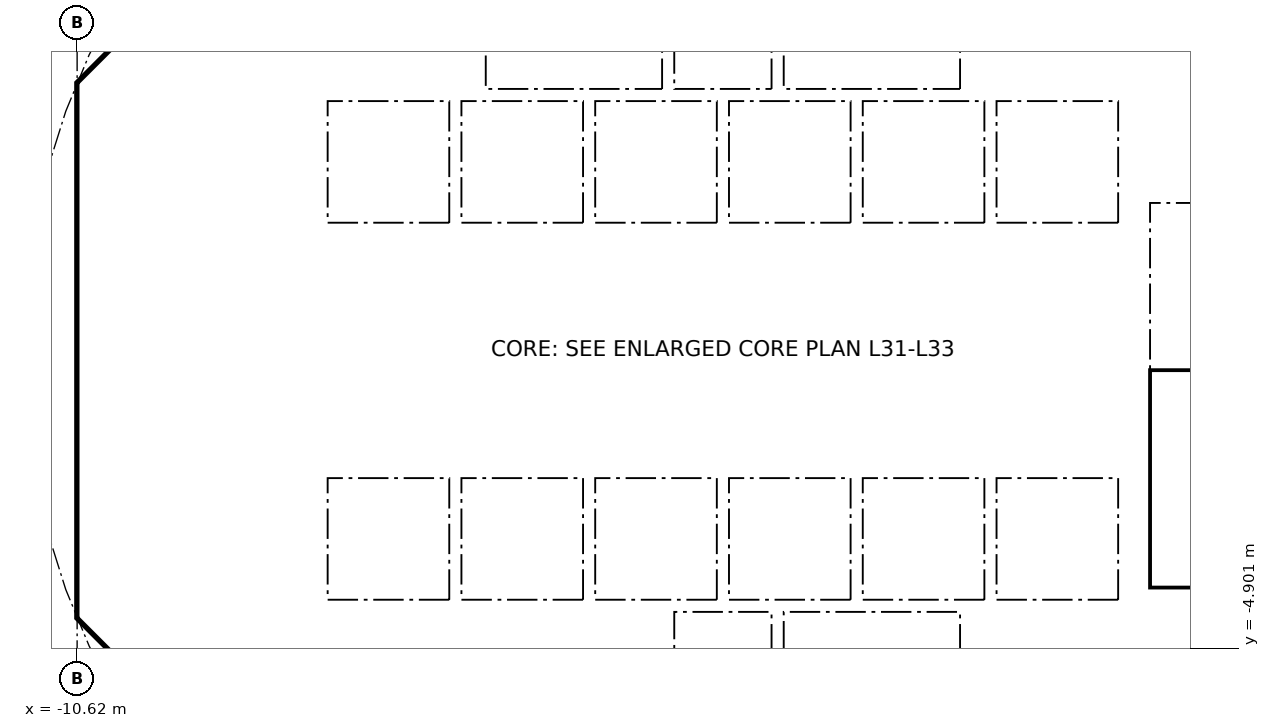
"""IFC4 building model, lengths in metres.
Left out: names, types, materials, properties, quantities, classifications, styles, units other than length and angle.
Written with IfcOpenShell. Run it as: python <this file> out.ifc"""

import sys

from ifc_helpers import new_model, si_unit, direction, frame, frame_2d, origin, place, context, subcontext, project, spatial, polyline, rectangle, outline, extrude, element, fill, save


model = new_model("IFC4")
c1 = context("Model", 3, precision=1e-05, world=origin(), true_north=direction((0.0, 1.0)))
c2 = subcontext(c1, "Body", "Model", "MODEL_VIEW")
j1 = project(units=[si_unit("LENGTHUNIT", "METRE"), si_unit("PLANEANGLEUNIT", "RADIAN")], contexts=[c1])
p1 = place(None, origin())
s1 = spatial("IfcSite", under=j1, at=p1, CompositionType="ELEMENT")
p2 = place(p1, origin())
s2 = spatial("IfcBuilding", under=s1, at=p2, CompositionType="ELEMENT")
p3 = place(p2, frame((0.0, 0.0, 134.4)))
s3 = spatial("IfcBuildingStorey", under=s2, at=p3, CompositionType="ELEMENT", Elevation=134.4)
p4 = place(p3, frame((9.988, 4.613, 0.0), z_axis=(0.0, 0.0, 1.0), x_axis=(-0.707106781187, 0.707106781187, 0.0)))
e1 = element("IfcWall", 1, at=p4, inside=s3, PredefinedType="SHEAR", context=c2, shape_type="SweptSolid", body=[
    extrude(rectangle(XDim=7.602, YDim=0.6, at=frame_2d((3.801, 0.0))), origin(), (0.0, 0.0, 1.0), 3.44),
])
p5 = place(p4, frame((3.201, 0.0, 0.0)))
e2 = element("IfcOpeningElement", 2, at=p5, cuts=e1, PredefinedType="OPENING", context=c2, shape_type="SweptSolid", body=[
    extrude(rectangle(XDim=1.2, YDim=2.1, at=frame_2d((0.6, 1.05))), frame((0.0, 0.31, 0.0), z_axis=(0.0, -1.0, 0.0), x_axis=(1.0, 0.0, 0.0)), (0.0, 0.0, 1.0), 0.62),
])
p6 = place(p3, frame((-4.613, 9.988, 0.0), z_axis=(0.0, 0.0, 1.0), x_axis=(-0.707106781187, -0.707106781187, 0.0)))
e3 = element("IfcWall", 3, at=p6, inside=s3, PredefinedType="SHEAR", context=c2, shape_type="SweptSolid", body=[
    extrude(rectangle(XDim=7.602, YDim=0.6, at=frame_2d((3.801, 0.0))), origin(), (0.0, 0.0, 1.0), 3.44),
])
p7 = place(p6, frame((0.351, 0.0, 0.0)))
e4 = element("IfcOpeningElement", 4, at=p7, cuts=e3, PredefinedType="OPENING", context=c2, shape_type="SweptSolid", body=[
    extrude(rectangle(XDim=1.1, YDim=2.1, at=frame_2d((0.55, 1.05))), frame((0.0, 0.31, 0.0), z_axis=(0.0, -1.0, 0.0), x_axis=(1.0, 0.0, 0.0)), (0.0, 0.0, 1.0), 0.62),
])
p8 = place(p3, frame((-10.325, 3.801, 0.0), z_axis=(0.0, 0.0, 1.0), x_axis=(0.0, -1.0, 0.0)))
e5 = element("IfcWall", 5, at=p8, inside=s3, PredefinedType="SHEAR", context=c2, shape_type="SweptSolid", body=[
    extrude(rectangle(XDim=7.602, YDim=0.6, at=frame_2d((3.801, 0.0))), origin(), (0.0, 0.0, 1.0), 3.44),
])
p9 = place(p8, frame((0.651, 0.0, 0.0)))
e6 = element("IfcOpeningElement", 6, at=p9, cuts=e5, PredefinedType="OPENING", context=c2, shape_type="SweptSolid", body=[
    extrude(rectangle(XDim=1.5, YDim=2.1, at=frame_2d((0.75, 1.05))), frame((0.0, 0.31, 0.0), z_axis=(0.0, -1.0, 0.0), x_axis=(1.0, 0.0, 0.0)), (0.0, 0.0, 1.0), 0.62),
])
p10 = place(p8, frame((5.451, 0.0, 0.0)))
e7 = element("IfcOpeningElement", 7, at=p10, cuts=e5, PredefinedType="OPENING", context=c2, shape_type="SweptSolid", body=[
    extrude(rectangle(XDim=1.5, YDim=2.1, at=frame_2d((0.75, 1.05))), frame((0.0, 0.31, 0.0), z_axis=(0.0, -1.0, 0.0), x_axis=(1.0, 0.0, 0.0)), (0.0, 0.0, 1.0), 0.62),
])
p11 = place(p3, frame((-9.988, -4.613, 0.0), z_axis=(0.0, 0.0, 1.0), x_axis=(0.707106781187, -0.707106781187, 0.0)))
e8 = element("IfcWall", 8, at=p11, inside=s3, PredefinedType="SHEAR", context=c2, shape_type="SweptSolid", body=[
    extrude(rectangle(XDim=7.602, YDim=0.6, at=frame_2d((3.801, 0.0))), origin(), (0.0, 0.0, 1.0), 3.44),
])
p12 = place(p11, frame((6.151, 0.0, 0.0)))
e9 = element("IfcOpeningElement", 9, at=p12, cuts=e8, PredefinedType="OPENING", context=c2, shape_type="SweptSolid", body=[
    extrude(rectangle(XDim=1.1, YDim=2.1, at=frame_2d((0.55, 1.05))), frame((0.0, 0.31, 0.0), z_axis=(0.0, -1.0, 0.0), x_axis=(1.0, 0.0, 0.0)), (0.0, 0.0, 1.0), 0.62),
])
p13 = place(p3, frame((4.613, -9.988, 0.0), z_axis=(0.0, 0.0, 1.0), x_axis=(0.707106781187, 0.707106781187, 0.0)))
e10 = element("IfcWall", 10, at=p13, inside=s3, PredefinedType="SHEAR", context=c2, shape_type="SweptSolid", body=[
    extrude(rectangle(XDim=7.602, YDim=0.6, at=frame_2d((3.801, 0.0))), origin(), (0.0, 0.0, 1.0), 3.44),
])
p14 = place(p13, frame((3.201, 0.0, 0.0)))
e11 = element("IfcOpeningElement", 11, at=p14, cuts=e10, PredefinedType="OPENING", context=c2, shape_type="SweptSolid", body=[
    extrude(rectangle(XDim=1.2, YDim=2.1, at=frame_2d((0.6, 1.05))), frame((0.0, 0.31, 0.0), z_axis=(0.0, -1.0, 0.0), x_axis=(1.0, 0.0, 0.0)), (0.0, 0.0, 1.0), 0.62),
])
p15 = place(p3, frame((-6.2, 4.3, 0.0), z_axis=(0.0, 0.0, 1.0), x_axis=(0.0, 1.0, 0.0)))
e12 = element("IfcWall", 12, at=p15, inside=s3, PredefinedType="PARTITIONING", context=c2, shape_type="SweptSolid", body=[
    extrude(rectangle(XDim=3.527, YDim=0.15, at=frame_2d((1.763, 0.0))), origin(), (0.0, 0.0, 1.0), 3.44),
])
p16 = place(p15, frame((0.262, 0.0, 0.0)))
e13 = element("IfcOpeningElement", 13, at=p16, cuts=e12, PredefinedType="OPENING", context=c2, shape_type="SweptSolid", body=[
    extrude(rectangle(XDim=0.9, YDim=2.1, at=frame_2d((0.45, 1.05))), frame((0.0, 0.085, 0.0), z_axis=(0.0, -1.0, 0.0), x_axis=(1.0, 0.0, 0.0)), (0.0, 0.0, 1.0), 0.17),
])
p17 = place(p15, frame((2.138, 0.0, 0.0)))
e14 = element("IfcOpeningElement", 14, at=p17, cuts=e12, PredefinedType="OPENING", context=c2, shape_type="SweptSolid", body=[
    extrude(rectangle(XDim=0.9, YDim=2.1, at=frame_2d((0.45, 1.05))), frame((0.0, 0.085, 0.0), z_axis=(0.0, -1.0, 0.0), x_axis=(1.0, 0.0, 0.0)), (0.0, 0.0, 1.0), 0.17),
])
p18 = place(p3, frame((4.0, 4.3, 0.0), z_axis=(0.0, 0.0, 1.0), x_axis=(0.0, 1.0, 0.0)))
e15 = element("IfcWall", 15, at=p18, inside=s3, PredefinedType="SOLIDWALL", context=c2, shape_type="SweptSolid", body=[
    extrude(rectangle(XDim=2.2, YDim=0.2, at=frame_2d((1.1, 0.0))), origin(), (0.0, 0.0, 1.0), 3.44),
])
p19 = place(p18, frame((0.55, 0.0, 0.0)))
e16 = element("IfcOpeningElement", 16, at=p19, cuts=e15, PredefinedType="OPENING", context=c2, shape_type="SweptSolid", body=[
    extrude(rectangle(XDim=1.1, YDim=2.1, at=frame_2d((0.55, 1.05))), frame((0.0, 0.11, 0.0), z_axis=(0.0, -1.0, 0.0), x_axis=(1.0, 0.0, 0.0)), (0.0, 0.0, 1.0), 0.22),
])
p20 = place(p3, frame((-4.0, 4.3, 0.0), z_axis=(0.0, 0.0, 1.0), x_axis=(0.0, 1.0, 0.0)))
e17 = element("IfcWall", 17, at=p20, inside=s3, PredefinedType="SOLIDWALL", context=c2, shape_type="SweptSolid", body=[
    extrude(rectangle(XDim=2.2, YDim=0.2, at=frame_2d((1.1, 0.0))), origin(), (0.0, 0.0, 1.0), 3.44),
])
p21 = place(p20, frame((0.55, 0.0, 0.0)))
e18 = element("IfcOpeningElement", 18, at=p21, cuts=e17, PredefinedType="OPENING", context=c2, shape_type="SweptSolid", body=[
    extrude(rectangle(XDim=1.1, YDim=2.1, at=frame_2d((0.55, 1.05))), frame((0.0, 0.11, 0.0), z_axis=(0.0, -1.0, 0.0), x_axis=(1.0, 0.0, 0.0)), (0.0, 0.0, 1.0), 0.22),
])
p22 = place(p3, frame((-6.7, 2.0, 0.0), z_axis=(0.0, 0.0, 1.0), x_axis=(1.0, 0.0, 0.0)))
e19 = element("IfcWall", 19, at=p22, inside=s3, PredefinedType="SOLIDWALL", context=c2, shape_type="SweptSolid", body=[
    extrude(rectangle(XDim=13.4, YDim=0.2, at=frame_2d((6.7, 0.0))), origin(), (0.0, 0.0, 1.0), 3.44),
])
p23 = place(p22, frame((0.65, 0.0, 0.0)))
e20 = element("IfcOpeningElement", 20, at=p23, cuts=e19, PredefinedType="OPENING", context=c2, shape_type="SweptSolid", body=[
    extrude(rectangle(XDim=1.1, YDim=2.1, at=frame_2d((0.55, 1.05))), frame((0.0, 0.11, 0.0), z_axis=(0.0, -1.0, 0.0), x_axis=(1.0, 0.0, 0.0)), (0.0, 0.0, 1.0), 0.22),
])
p24 = place(p22, frame((2.85, 0.0, 0.0)))
e21 = element("IfcOpeningElement", 21, at=p24, cuts=e19, PredefinedType="OPENING", context=c2, shape_type="SweptSolid", body=[
    extrude(rectangle(XDim=1.1, YDim=2.1, at=frame_2d((0.55, 1.05))), frame((0.0, 0.11, 0.0), z_axis=(0.0, -1.0, 0.0), x_axis=(1.0, 0.0, 0.0)), (0.0, 0.0, 1.0), 0.22),
])
p25 = place(p22, frame((5.05, 0.0, 0.0)))
e22 = element("IfcOpeningElement", 22, at=p25, cuts=e19, PredefinedType="OPENING", context=c2, shape_type="SweptSolid", body=[
    extrude(rectangle(XDim=1.1, YDim=2.1, at=frame_2d((0.55, 1.05))), frame((0.0, 0.11, 0.0), z_axis=(0.0, -1.0, 0.0), x_axis=(1.0, 0.0, 0.0)), (0.0, 0.0, 1.0), 0.22),
])
p26 = place(p3, frame((6.7, 4.0, 0.0), z_axis=(0.0, 0.0, 1.0), x_axis=(1.0, 0.0, 0.0)))
e23 = element("IfcWall", 23, at=p26, inside=s3, PredefinedType="SOLIDWALL", context=c2, shape_type="SweptSolid", body=[
    extrude(rectangle(XDim=3.325, YDim=0.2, at=frame_2d((1.662, 0.0))), origin(), (0.0, 0.0, 1.0), 3.44),
])
p27 = place(p26, frame((1.25, 0.0, 0.0)))
e24 = element("IfcOpeningElement", 24, at=p27, cuts=e23, PredefinedType="OPENING", context=c2, shape_type="SweptSolid", body=[
    extrude(rectangle(XDim=1.1, YDim=2.1, at=frame_2d((0.55, 1.05))), frame((0.0, 0.11, 0.0), z_axis=(0.0, -1.0, 0.0), x_axis=(1.0, 0.0, 0.0)), (0.0, 0.0, 1.0), 0.22),
])
p28 = place(p3, frame((-6.2, -7.827, 0.0), z_axis=(0.0, 0.0, 1.0), x_axis=(0.0, 1.0, 0.0)))
e25 = element("IfcWall", 25, at=p28, inside=s3, PredefinedType="PARTITIONING", context=c2, shape_type="SweptSolid", body=[
    extrude(rectangle(XDim=3.527, YDim=0.15, at=frame_2d((1.763, 0.0))), origin(), (0.0, 0.0, 1.0), 3.44),
])
p29 = place(p28, frame((2.365, 0.0, 0.0)))
e26 = element("IfcOpeningElement", 26, at=p29, cuts=e25, PredefinedType="OPENING", context=c2, shape_type="SweptSolid", body=[
    extrude(rectangle(XDim=0.9, YDim=2.1, at=frame_2d((0.45, 1.05))), frame((0.0, 0.085, 0.0), z_axis=(0.0, -1.0, 0.0), x_axis=(1.0, 0.0, 0.0)), (0.0, 0.0, 1.0), 0.17),
])
p30 = place(p28, frame((0.489, 0.0, 0.0)))
e27 = element("IfcOpeningElement", 27, at=p30, cuts=e25, PredefinedType="OPENING", context=c2, shape_type="SweptSolid", body=[
    extrude(rectangle(XDim=0.9, YDim=2.1, at=frame_2d((0.45, 1.05))), frame((0.0, 0.085, 0.0), z_axis=(0.0, -1.0, 0.0), x_axis=(1.0, 0.0, 0.0)), (0.0, 0.0, 1.0), 0.17),
])
p31 = place(p3, frame((4.0, -6.5, 0.0), z_axis=(0.0, 0.0, 1.0), x_axis=(0.0, 1.0, 0.0)))
e28 = element("IfcWall", 28, at=p31, inside=s3, PredefinedType="SOLIDWALL", context=c2, shape_type="SweptSolid", body=[
    extrude(rectangle(XDim=2.2, YDim=0.2, at=frame_2d((1.1, 0.0))), origin(), (0.0, 0.0, 1.0), 3.44),
])
p32 = place(p31, frame((0.55, 0.0, 0.0)))
e29 = element("IfcOpeningElement", 29, at=p32, cuts=e28, PredefinedType="OPENING", context=c2, shape_type="SweptSolid", body=[
    extrude(rectangle(XDim=1.1, YDim=2.1, at=frame_2d((0.55, 1.05))), frame((0.0, 0.11, 0.0), z_axis=(0.0, -1.0, 0.0), x_axis=(1.0, 0.0, 0.0)), (0.0, 0.0, 1.0), 0.22),
])
p33 = place(p3, frame((-4.0, -6.5, 0.0), z_axis=(0.0, 0.0, 1.0), x_axis=(0.0, 1.0, 0.0)))
e30 = element("IfcWall", 30, at=p33, inside=s3, PredefinedType="SOLIDWALL", context=c2, shape_type="SweptSolid", body=[
    extrude(rectangle(XDim=2.2, YDim=0.2, at=frame_2d((1.1, 0.0))), origin(), (0.0, 0.0, 1.0), 3.44),
])
p34 = place(p33, frame((0.65, 0.0, 0.0)))
e31 = element("IfcOpeningElement", 31, at=p34, cuts=e30, PredefinedType="OPENING", context=c2, shape_type="SweptSolid", body=[
    extrude(rectangle(XDim=0.9, YDim=2.1, at=frame_2d((0.45, 1.05))), frame((0.0, 0.11, 0.0), z_axis=(0.0, -1.0, 0.0), x_axis=(1.0, 0.0, 0.0)), (0.0, 0.0, 1.0), 0.22),
])
p35 = place(p3, frame((-6.7, -2.0, 0.0), z_axis=(0.0, 0.0, 1.0), x_axis=(1.0, 0.0, 0.0)))
e32 = element("IfcWall", 32, at=p35, inside=s3, PredefinedType="SOLIDWALL", context=c2, shape_type="SweptSolid", body=[
    extrude(rectangle(XDim=13.4, YDim=0.2, at=frame_2d((6.7, 0.0))), origin(), (0.0, 0.0, 1.0), 3.44),
])
p36 = place(p35, frame((0.65, 0.0, 0.0)))
e33 = element("IfcOpeningElement", 33, at=p36, cuts=e32, PredefinedType="OPENING", context=c2, shape_type="SweptSolid", body=[
    extrude(rectangle(XDim=1.1, YDim=2.1, at=frame_2d((0.55, 1.05))), frame((0.0, 0.11, 0.0), z_axis=(0.0, -1.0, 0.0), x_axis=(1.0, 0.0, 0.0)), (0.0, 0.0, 1.0), 0.22),
])
p37 = place(p35, frame((2.85, 0.0, 0.0)))
e34 = element("IfcOpeningElement", 34, at=p37, cuts=e32, PredefinedType="OPENING", context=c2, shape_type="SweptSolid", body=[
    extrude(rectangle(XDim=1.1, YDim=2.1, at=frame_2d((0.55, 1.05))), frame((0.0, 0.11, 0.0), z_axis=(0.0, -1.0, 0.0), x_axis=(1.0, 0.0, 0.0)), (0.0, 0.0, 1.0), 0.22),
])
p38 = place(p3, origin())
e35 = element("IfcWall", 35, at=p38, inside=s3, PredefinedType="SHEAR", context=c2, shape_type="SweptSolid", body=[
    extrude(outline(polyline([(-10.625, -3.801), (-10.025, -3.801), (-10.025, -4.152), (-9.776, -4.401), (-10.2, -4.825), (-10.625, -4.401), (-10.625, -3.801)])), origin(), (0.0, 0.0, 1.0), 3.44),
])
p39 = place(p3, origin())
e36 = element("IfcWall", 36, at=p39, inside=s3, PredefinedType="SHEAR", context=c2, shape_type="SweptSolid", body=[
    extrude(outline(polyline([(-10.2, 4.825), (-9.776, 4.401), (-10.025, 4.152), (-10.025, 3.801), (-10.625, 3.801), (-10.625, 4.401), (-10.2, 4.825)])), origin(), (0.0, 0.0, 1.0), 3.44),
])
for number, where, z_axis, x_axis in (
    (37, (-10.025, -4.0, 0.0), (0.0, 0.0, 1.0), (1.0, 0.0, 0.0)),
    (38, (-10.025, 4.0, 0.0), (0.0, 0.0, 1.0), (1.0, 0.0, 0.0)),
):
    element("IfcWall", number, at=place(p3, frame(where, z_axis=z_axis, x_axis=x_axis)), inside=s3, PredefinedType="PARTITIONING", context=c2, shape_type="SweptSolid", body=[
        extrude(rectangle(XDim=3.325, YDim=0.2, at=frame_2d((1.662, 0.0))), origin(), (0.0, 0.0, 1.0), 3.44),
    ])
for number, where, z_axis, x_axis in (
    (39, (-0.9, -6.5, 0.0), (0.0, 0.0, 1.0), (0.0, 1.0, 0.0)),
    (40, (0.9, -6.5, 0.0), (0.0, 0.0, 1.0), (0.0, 1.0, 0.0)),
):
    element("IfcWall", number, at=place(p3, frame(where, z_axis=z_axis, x_axis=x_axis)), inside=s3, PredefinedType="SOLIDWALL", context=c2, shape_type="SweptSolid", body=[
        extrude(rectangle(XDim=2.2, YDim=0.2, at=frame_2d((1.1, 0.0))), origin(), (0.0, 0.0, 1.0), 3.44),
    ])
p40 = place(p3, origin())
e41 = element("IfcWall", 41, at=p40, inside=s3, PredefinedType="SOLIDWALL", context=c2, shape_type="SweptSolid", body=[
    extrude(outline(polyline([(-6.7, -2.1), (-6.5, -2.1), (-6.5, -4.1), (-4.5, -4.1), (-4.5, -2.1), (-4.3, -2.1), (-4.3, -4.1), (-2.3, -4.1), (-2.3, -2.1), (-2.1, -2.1), (-2.1, -4.1), (-0.1, -4.1), (-0.1, -2.1), (0.1, -2.1), (0.1, -4.1), (2.1, -4.1), (2.1, -2.1), (2.3, -2.1), (2.3, -4.1), (4.3, -4.1), (4.3, -2.1), (4.5, -2.1), (4.5, -4.1), (6.5, -4.1), (6.5, -2.1), (6.7, -2.1), (6.7, -4.3), (-6.7, -4.3), (-6.7, -2.1)])), origin(), (0.0, 0.0, 1.0), 3.44),
])
for number, where, z_axis, x_axis in (
    (42, (-0.9, 4.3, 0.0), (0.0, 0.0, 1.0), (0.0, 1.0, 0.0)),
    (43, (0.9, 4.3, 0.0), (0.0, 0.0, 1.0), (0.0, 1.0, 0.0)),
):
    element("IfcWall", number, at=place(p3, frame(where, z_axis=z_axis, x_axis=x_axis)), inside=s3, PredefinedType="SOLIDWALL", context=c2, shape_type="SweptSolid", body=[
        extrude(rectangle(XDim=2.2, YDim=0.2, at=frame_2d((1.1, 0.0))), origin(), (0.0, 0.0, 1.0), 3.44),
    ])
p41 = place(p3, origin())
e44 = element("IfcWall", 44, at=p41, inside=s3, PredefinedType="SOLIDWALL", context=c2, shape_type="SweptSolid", body=[
    extrude(outline(polyline([(-6.5, 2.1), (-6.7, 2.1), (-6.7, 4.3), (6.7, 4.3), (6.7, 2.1), (6.5, 2.1), (6.5, 4.1), (4.5, 4.1), (4.5, 2.1), (4.3, 2.1), (4.3, 4.1), (2.3, 4.1), (2.3, 2.1), (2.1, 2.1), (2.1, 4.1), (0.1, 4.1), (0.1, 2.1), (-0.1, 2.1), (-0.1, 4.1), (-2.1, 4.1), (-2.1, 2.1), (-2.3, 2.1), (-2.3, 4.1), (-4.3, 4.1), (-4.3, 2.1), (-4.5, 2.1), (-4.5, 4.1), (-6.5, 4.1), (-6.5, 2.1)])), origin(), (0.0, 0.0, 1.0), 3.44),
])
p42 = place(p3, origin())
e45 = element("IfcWall", 45, at=p42, inside=s3, PredefinedType="SOLIDWALL", context=c2, shape_type="SweptSolid", body=[
    extrude(outline(polyline([(7.025, -3.9), (6.7, -3.9), (6.7, 3.9), (7.025, 3.9), (7.025, -3.9)])), origin(), (0.0, 0.0, 1.0), 3.44),
])
p43 = place(p3, origin())
e46 = element("IfcWall", 46, at=p43, inside=s3, PredefinedType="SOLIDWALL", context=c2, shape_type="SweptSolid", body=[
    extrude(outline(polyline([(10.025, -4.1), (6.7, -4.1), (6.7, -3.9), (10.025, -3.9), (10.025, -4.1)])), origin(), (0.0, 0.0, 1.0), 3.44),
])
p44 = place(p23, origin())
e47 = element("IfcDoor", 47, at=p44, inside=s3, OperationType="DOUBLE_DOOR_SLIDING", PredefinedType="DOOR", context=c2, shape_type="SweptSolid", body=[
    extrude(rectangle(XDim=1.1, YDim=2.1, at=frame_2d((0.55, 1.05))), frame((0.0, 0.025, 0.0), z_axis=(0.0, -1.0, 0.0), x_axis=(1.0, 0.0, 0.0)), (0.0, 0.0, 1.0), 0.05),
])
fill(e20, e47)
p45 = place(p24, origin())
e48 = element("IfcDoor", 48, at=p45, inside=s3, OperationType="DOUBLE_DOOR_SLIDING", PredefinedType="DOOR", context=c2, shape_type="SweptSolid", body=[
    extrude(rectangle(XDim=1.1, YDim=2.1, at=frame_2d((0.55, 1.05))), frame((0.0, 0.025, 0.0), z_axis=(0.0, -1.0, 0.0), x_axis=(1.0, 0.0, 0.0)), (0.0, 0.0, 1.0), 0.05),
])
fill(e21, e48)
p46 = place(p25, origin())
e49 = element("IfcDoor", 49, at=p46, inside=s3, OperationType="DOUBLE_DOOR_SLIDING", PredefinedType="DOOR", context=c2, shape_type="SweptSolid", body=[
    extrude(rectangle(XDim=1.1, YDim=2.1, at=frame_2d((0.55, 1.05))), frame((0.0, 0.025, 0.0), z_axis=(0.0, -1.0, 0.0), x_axis=(1.0, 0.0, 0.0)), (0.0, 0.0, 1.0), 0.05),
])
fill(e22, e49)
p47 = place(p36, origin())
e50 = element("IfcDoor", 50, at=p47, inside=s3, OperationType="DOUBLE_DOOR_SLIDING", PredefinedType="DOOR", context=c2, shape_type="SweptSolid", body=[
    extrude(rectangle(XDim=1.1, YDim=2.1, at=frame_2d((0.55, 1.05))), frame((0.0, 0.025, 0.0), z_axis=(0.0, -1.0, 0.0), x_axis=(1.0, 0.0, 0.0)), (0.0, 0.0, 1.0), 0.05),
])
fill(e33, e50)
p48 = place(p37, origin())
e51 = element("IfcDoor", 51, at=p48, inside=s3, OperationType="DOUBLE_DOOR_SLIDING", PredefinedType="DOOR", context=c2, shape_type="SweptSolid", body=[
    extrude(rectangle(XDim=1.1, YDim=2.1, at=frame_2d((0.55, 1.05))), frame((0.0, 0.025, 0.0), z_axis=(0.0, -1.0, 0.0), x_axis=(1.0, 0.0, 0.0)), (0.0, 0.0, 1.0), 0.05),
])
fill(e34, e51)
p49 = place(p19, origin())
e52 = element("IfcDoor", 52, at=p49, inside=s3, OperationType="DOUBLE_DOOR_SLIDING", PredefinedType="DOOR", context=c2, shape_type="SweptSolid", body=[
    extrude(rectangle(XDim=1.1, YDim=2.1, at=frame_2d((0.55, 1.05))), frame((0.0, 0.025, 0.0), z_axis=(0.0, -1.0, 0.0), x_axis=(1.0, 0.0, 0.0)), (0.0, 0.0, 1.0), 0.05),
])
fill(e16, e52)
p50 = place(p32, origin())
e53 = element("IfcDoor", 53, at=p50, inside=s3, OperationType="DOUBLE_DOOR_SLIDING", PredefinedType="DOOR", context=c2, shape_type="SweptSolid", body=[
    extrude(rectangle(XDim=1.1, YDim=2.1, at=frame_2d((0.55, 1.05))), frame((0.0, 0.025, 0.0), z_axis=(0.0, -1.0, 0.0), x_axis=(1.0, 0.0, 0.0)), (0.0, 0.0, 1.0), 0.05),
])
fill(e29, e53)
p51 = place(p21, origin())
e54 = element("IfcDoor", 54, at=p51, inside=s3, OperationType="DOUBLE_DOOR_SLIDING", PredefinedType="DOOR", context=c2, shape_type="SweptSolid", body=[
    extrude(rectangle(XDim=1.1, YDim=2.1, at=frame_2d((0.55, 1.05))), frame((0.0, 0.025, 0.0), z_axis=(0.0, -1.0, 0.0), x_axis=(1.0, 0.0, 0.0)), (0.0, 0.0, 1.0), 0.05),
])
fill(e18, e54)
p52 = place(p16, origin())
e55 = element("IfcDoor", 55, at=p52, inside=s3, OperationType="SINGLE_SWING_LEFT", PredefinedType="DOOR", context=c2, shape_type="SweptSolid", body=[
    extrude(rectangle(XDim=0.9, YDim=2.1, at=frame_2d((0.45, 1.05))), frame((0.0, 0.025, 0.0), z_axis=(0.0, -1.0, 0.0), x_axis=(1.0, 0.0, 0.0)), (0.0, 0.0, 1.0), 0.05),
])
fill(e13, e55)
p53 = place(p29, origin())
e56 = element("IfcDoor", 56, at=p53, inside=s3, OperationType="SINGLE_SWING_LEFT", PredefinedType="DOOR", context=c2, shape_type="SweptSolid", body=[
    extrude(rectangle(XDim=0.9, YDim=2.1, at=frame_2d((0.45, 1.05))), frame((0.0, 0.025, 0.0), z_axis=(0.0, -1.0, 0.0), x_axis=(1.0, 0.0, 0.0)), (0.0, 0.0, 1.0), 0.05),
])
fill(e26, e56)
p54 = place(p9, origin())
e57 = element("IfcDoor", 57, at=p54, inside=s3, OperationType="DOUBLE_DOOR_SINGLE_SWING", PredefinedType="DOOR", context=c2, shape_type="SweptSolid", body=[
    extrude(rectangle(XDim=1.5, YDim=2.1, at=frame_2d((0.75, 1.05))), frame((0.0, 0.025, 0.0), z_axis=(0.0, -1.0, 0.0), x_axis=(1.0, 0.0, 0.0)), (0.0, 0.0, 1.0), 0.05),
])
fill(e6, e57)
p55 = place(p10, origin())
e58 = element("IfcDoor", 58, at=p55, inside=s3, OperationType="DOUBLE_DOOR_SINGLE_SWING", PredefinedType="DOOR", context=c2, shape_type="SweptSolid", body=[
    extrude(rectangle(XDim=1.5, YDim=2.1, at=frame_2d((0.75, 1.05))), frame((0.0, 0.025, 0.0), z_axis=(0.0, -1.0, 0.0), x_axis=(1.0, 0.0, 0.0)), (0.0, 0.0, 1.0), 0.05),
])
fill(e7, e58)
save(model, sys.argv[1])
